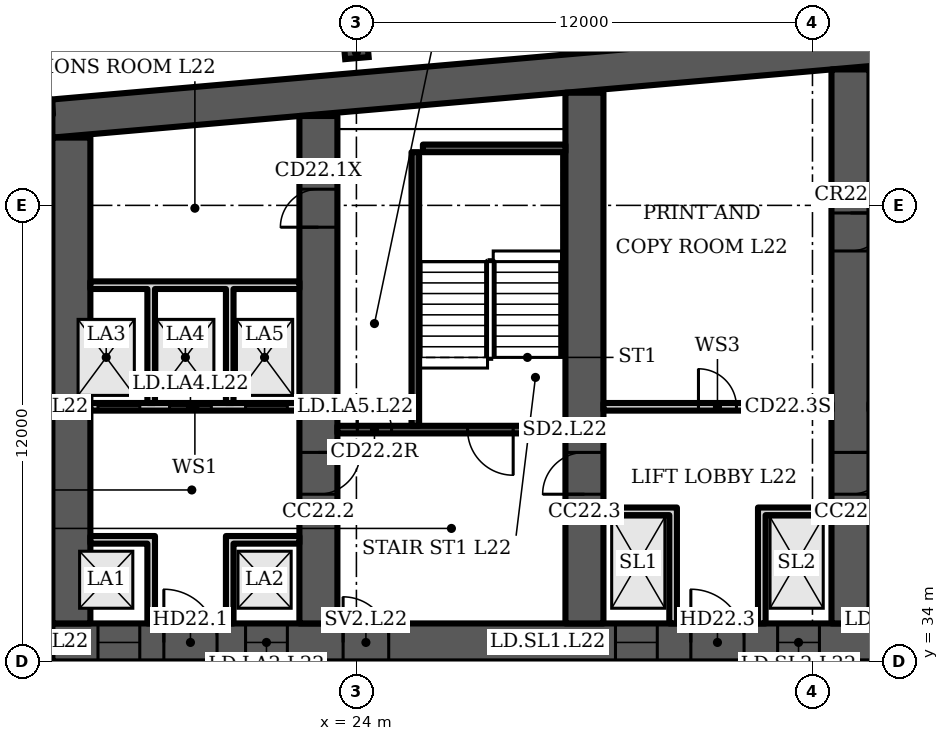
"""IFC4 building model, lengths in metres.
Left out: names, types, materials, properties, quantities, classifications, styles, units other than length and angle.
Written with IfcOpenShell. Run it as: python <this file> out.ifc"""

import sys

from ifc_helpers import new_model, si_unit, direction, frame, frame_2d, origin, origin_2d, place, context, subcontext, project, spatial, polyline, rectangle, i_section, outline, extrude, element, fill, save


model = new_model("IFC4")
c1 = context("Model", 3, precision=1e-05, world=origin(), true_north=direction((0.0, 1.0)))
c2 = subcontext(c1, "Body", "Model", "MODEL_VIEW")
j1 = project(units=[si_unit("LENGTHUNIT", "METRE"), si_unit("PLANEANGLEUNIT", "RADIAN")], contexts=[c1])
p1 = place(None, origin())
s1 = spatial("IfcSite", under=j1, at=p1, CompositionType="ELEMENT")
p2 = place(p1, origin())
s2 = spatial("IfcBuilding", under=s1, at=p2, CompositionType="ELEMENT")
p3 = place(p2, frame((0.0, 0.0, 100.3)))
s3 = spatial("IfcBuildingStorey", under=s2, at=p3, CompositionType="ELEMENT", Elevation=100.3)
p4 = place(p3, frame((0.0, 0.0, -0.0)))
e1 = element("IfcWall", 1, at=p4, inside=s3, PredefinedType="SHEAR", context=c2, shape_type="SweptSolid", body=[
    extrude(outline(polyline([(16.0, 47.784), (40.5, 49.927), (65.0, 47.784), (65.0, 48.787), (40.5, 50.931), (16.0, 48.787), (16.0, 47.784)])), origin(), (0.0, 0.0, 1.0), 3.6),
])
p5 = place(p3, frame((16.0, 34.5, 0.0), z_axis=(0.0, 0.0, 1.0), x_axis=(1.0, 0.0, 0.0)))
e2 = element("IfcWall", 2, at=p5, inside=s3, PredefinedType="SHEAR", context=c2, shape_type="SweptSolid", body=[
    extrude(rectangle(XDim=49.0, YDim=1.0, at=frame_2d((24.5, 0.0))), origin(), (0.0, 0.0, 1.0), 3.6),
])
p6 = place(p5, frame((1.2, 0.0, 0.0)))
e3 = element("IfcOpeningElement", 3, at=p6, cuts=e2, PredefinedType="OPENING", context=c2, shape_type="SweptSolid", body=[
    extrude(rectangle(XDim=1.1, YDim=2.1, at=frame_2d((0.55, 1.05))), frame((0.0, 0.51, 0.0), z_axis=(0.0, -1.0, 0.0), x_axis=(1.0, 0.0, 0.0)), (0.0, 0.0, 1.0), 1.02),
])
p7 = place(p5, frame((5.083, 0.0, 0.0)))
e4 = element("IfcOpeningElement", 4, at=p7, cuts=e2, PredefinedType="OPENING", context=c2, shape_type="SweptSolid", body=[
    extrude(rectangle(XDim=1.1, YDim=2.1, at=frame_2d((0.55, 1.05))), frame((0.0, 0.51, 0.0), z_axis=(0.0, -1.0, 0.0), x_axis=(1.0, 0.0, 0.0)), (0.0, 0.0, 1.0), 1.02),
])
p8 = place(p5, frame((2.933, 0.0, 0.0)))
e5 = element("IfcOpeningElement", 5, at=p8, cuts=e2, PredefinedType="OPENING", context=c2, shape_type="SweptSolid", body=[
    extrude(rectangle(XDim=1.4, YDim=2.1, at=frame_2d((0.7, 1.05))), frame((0.0, 0.51, 0.0), z_axis=(0.0, -1.0, 0.0), x_axis=(1.0, 0.0, 0.0)), (0.0, 0.0, 1.0), 1.02),
])
p9 = place(p5, frame((7.65, 0.0, 0.0)))
e6 = element("IfcOpeningElement", 6, at=p9, cuts=e2, PredefinedType="OPENING", context=c2, shape_type="SweptSolid", body=[
    extrude(rectangle(XDim=1.2, YDim=2.1, at=frame_2d((0.6, 1.05))), frame((0.0, 0.51, 0.0), z_axis=(0.0, -1.0, 0.0), x_axis=(1.0, 0.0, 0.0)), (0.0, 0.0, 1.0), 1.02),
])
p10 = place(p5, frame((14.817, 0.0, 0.0)))
e7 = element("IfcOpeningElement", 7, at=p10, cuts=e2, PredefinedType="OPENING", context=c2, shape_type="SweptSolid", body=[
    extrude(rectangle(XDim=1.1, YDim=2.1, at=frame_2d((0.55, 1.05))), frame((0.0, 0.51, 0.0), z_axis=(0.0, -1.0, 0.0), x_axis=(1.0, 0.0, 0.0)), (0.0, 0.0, 1.0), 1.02),
])
p11 = place(p5, frame((19.083, 0.0, 0.0)))
e8 = element("IfcOpeningElement", 8, at=p11, cuts=e2, PredefinedType="OPENING", context=c2, shape_type="SweptSolid", body=[
    extrude(rectangle(XDim=1.1, YDim=2.1, at=frame_2d((0.55, 1.05))), frame((0.0, 0.51, 0.0), z_axis=(0.0, -1.0, 0.0), x_axis=(1.0, 0.0, 0.0)), (0.0, 0.0, 1.0), 1.02),
])
p12 = place(p5, frame((16.8, 0.0, 0.0)))
e9 = element("IfcOpeningElement", 9, at=p12, cuts=e2, PredefinedType="OPENING", context=c2, shape_type="SweptSolid", body=[
    extrude(rectangle(XDim=1.4, YDim=2.1, at=frame_2d((0.7, 1.05))), frame((0.0, 0.51, 0.0), z_axis=(0.0, -1.0, 0.0), x_axis=(1.0, 0.0, 0.0)), (0.0, 0.0, 1.0), 1.02),
])
p13 = place(p5, frame((21.817, 0.0, 0.0)))
e10 = element("IfcOpeningElement", 10, at=p13, cuts=e2, PredefinedType="OPENING", context=c2, shape_type="SweptSolid", body=[
    extrude(rectangle(XDim=1.1, YDim=2.1, at=frame_2d((0.55, 1.05))), frame((0.0, 0.51, 0.0), z_axis=(0.0, -1.0, 0.0), x_axis=(1.0, 0.0, 0.0)), (0.0, 0.0, 1.0), 1.02),
])
p14 = place(p5, frame((26.083, 0.0, 0.0)))
e11 = element("IfcOpeningElement", 11, at=p14, cuts=e2, PredefinedType="OPENING", context=c2, shape_type="SweptSolid", body=[
    extrude(rectangle(XDim=1.1, YDim=2.1, at=frame_2d((0.55, 1.05))), frame((0.0, 0.51, 0.0), z_axis=(0.0, -1.0, 0.0), x_axis=(1.0, 0.0, 0.0)), (0.0, 0.0, 1.0), 1.02),
])
p15 = place(p5, frame((33.15, 0.0, 0.0)))
e12 = element("IfcOpeningElement", 12, at=p15, cuts=e2, PredefinedType="OPENING", context=c2, shape_type="SweptSolid", body=[
    extrude(rectangle(XDim=1.2, YDim=2.1, at=frame_2d((0.6, 1.05))), frame((0.0, 0.51, 0.0), z_axis=(0.0, -1.0, 0.0), x_axis=(1.0, 0.0, 0.0)), (0.0, 0.0, 1.0), 1.02),
])
p16 = place(p5, frame((37.8, 0.0, 0.0)))
e13 = element("IfcOpeningElement", 13, at=p16, cuts=e2, PredefinedType="OPENING", context=c2, shape_type="SweptSolid", body=[
    extrude(rectangle(XDim=1.4, YDim=2.1, at=frame_2d((0.7, 1.05))), frame((0.0, 0.51, 0.0), z_axis=(0.0, -1.0, 0.0), x_axis=(1.0, 0.0, 0.0)), (0.0, 0.0, 1.0), 1.02),
])
p17 = place(p5, frame((42.817, 0.0, 0.0)))
e14 = element("IfcOpeningElement", 14, at=p17, cuts=e2, PredefinedType="OPENING", context=c2, shape_type="SweptSolid", body=[
    extrude(rectangle(XDim=1.1, YDim=2.1, at=frame_2d((0.55, 1.05))), frame((0.0, 0.51, 0.0), z_axis=(0.0, -1.0, 0.0), x_axis=(1.0, 0.0, 0.0)), (0.0, 0.0, 1.0), 1.02),
])
p18 = place(p5, frame((46.7, 0.0, 0.0)))
e15 = element("IfcOpeningElement", 15, at=p18, cuts=e2, PredefinedType="OPENING", context=c2, shape_type="SweptSolid", body=[
    extrude(rectangle(XDim=1.1, YDim=2.1, at=frame_2d((0.55, 1.05))), frame((0.0, 0.51, 0.0), z_axis=(0.0, -1.0, 0.0), x_axis=(1.0, 0.0, 0.0)), (0.0, 0.0, 1.0), 1.02),
])
p19 = place(p5, frame((44.667, 0.0, 0.0)))
e16 = element("IfcOpeningElement", 16, at=p19, cuts=e2, PredefinedType="OPENING", context=c2, shape_type="SweptSolid", body=[
    extrude(rectangle(XDim=1.4, YDim=2.1, at=frame_2d((0.7, 1.05))), frame((0.0, 0.51, 0.0), z_axis=(0.0, -1.0, 0.0), x_axis=(1.0, 0.0, 0.0)), (0.0, 0.0, 1.0), 1.02),
])
p20 = place(p3, frame((16.5, 35.0, 0.0), z_axis=(0.0, 0.0, 1.0), x_axis=(0.0, 1.0, 0.0)))
e17 = element("IfcWall", 17, at=p20, inside=s3, PredefinedType="SHEAR", context=c2, shape_type="SweptSolid", body=[
    extrude(rectangle(XDim=12.784, YDim=1.0, at=frame_2d((6.392, 0.0))), origin(), (0.0, 0.0, 1.0), 3.6),
])
p21 = place(p3, frame((23.0, 35.0, 0.0), z_axis=(0.0, 0.0, 1.0), x_axis=(0.0, 1.0, 0.0)))
e18 = element("IfcWall", 18, at=p21, inside=s3, PredefinedType="SHEAR", context=c2, shape_type="SweptSolid", body=[
    extrude(rectangle(XDim=13.352, YDim=1.0, at=frame_2d((6.676, 0.0))), origin(), (0.0, 0.0, 1.0), 3.6),
])
p22 = place(p21, frame((10.426, 0.0, 0.0)))
e19 = element("IfcOpeningElement", 19, at=p22, cuts=e18, PredefinedType="OPENING", context=c2, shape_type="SweptSolid", body=[
    extrude(rectangle(XDim=1.0, YDim=2.1, at=frame_2d((0.5, 1.05))), frame((0.0, 0.51, 0.0), z_axis=(0.0, -1.0, 0.0), x_axis=(1.0, 0.0, 0.0)), (0.0, 0.0, 1.0), 1.02),
])
p23 = place(p21, frame((3.4, 0.0, 0.0)))
e20 = element("IfcOpeningElement", 20, at=p23, cuts=e18, PredefinedType="OPENING", context=c2, shape_type="SweptSolid", body=[
    extrude(rectangle(XDim=1.1, YDim=2.1, at=frame_2d((0.55, 1.05))), frame((0.0, 0.51, 0.0), z_axis=(0.0, -1.0, 0.0), x_axis=(1.0, 0.0, 0.0)), (0.0, 0.0, 1.0), 1.02),
])
p24 = place(p3, frame((30.0, 35.0, 0.0), z_axis=(0.0, 0.0, 1.0), x_axis=(0.0, 1.0, 0.0)))
e21 = element("IfcWall", 21, at=p24, inside=s3, PredefinedType="SHEAR", context=c2, shape_type="SweptSolid", body=[
    extrude(rectangle(XDim=13.965, YDim=1.0, at=frame_2d((6.982, 0.0))), origin(), (0.0, 0.0, 1.0), 3.6),
])
p25 = place(p24, frame((3.4, 0.0, 0.0)))
e22 = element("IfcOpeningElement", 22, at=p25, cuts=e21, PredefinedType="OPENING", context=c2, shape_type="SweptSolid", body=[
    extrude(rectangle(XDim=1.1, YDim=2.1, at=frame_2d((0.55, 1.05))), frame((0.0, 0.51, 0.0), z_axis=(0.0, -1.0, 0.0), x_axis=(1.0, 0.0, 0.0)), (0.0, 0.0, 1.0), 1.02),
])
p26 = place(p3, frame((37.0, 35.0, 0.0), z_axis=(0.0, 0.0, 1.0), x_axis=(0.0, 1.0, 0.0)))
e23 = element("IfcWall", 23, at=p26, inside=s3, PredefinedType="SHEAR", context=c2, shape_type="SweptSolid", body=[
    extrude(rectangle(XDim=14.577, YDim=1.0, at=frame_2d((7.289, 0.0))), origin(), (0.0, 0.0, 1.0), 3.6),
])
p27 = place(p26, frame((3.4, 0.0, 0.0)))
e24 = element("IfcOpeningElement", 24, at=p27, cuts=e23, PredefinedType="OPENING", context=c2, shape_type="SweptSolid", body=[
    extrude(rectangle(XDim=1.1, YDim=2.1, at=frame_2d((0.55, 1.05))), frame((0.0, 0.51, 0.0), z_axis=(0.0, -1.0, 0.0), x_axis=(1.0, 0.0, 0.0)), (0.0, 0.0, 1.0), 1.02),
])
p28 = place(p26, frame((9.8, 0.0, 0.0)))
e25 = element("IfcOpeningElement", 25, at=p28, cuts=e23, PredefinedType="OPENING", context=c2, shape_type="SweptSolid", body=[
    extrude(rectangle(XDim=1.0, YDim=2.1, at=frame_2d((0.5, 1.05))), frame((0.0, 0.51, 0.0), z_axis=(0.0, -1.0, 0.0), x_axis=(1.0, 0.0, 0.0)), (0.0, 0.0, 1.0), 1.02),
])
p29 = place(p3, frame((24.0, 50.027, 0.0), z_axis=(0.0, 0.0, 1.0), x_axis=(-0.087156, 0.996198, 0.0)))
e26 = element("IfcColumn", 26, at=p29, inside=s3, PredefinedType="COLUMN", context=c2, shape_type="SweptSolid", body=[
    extrude(i_section(OverallWidth=0.305, OverallDepth=0.62, WebThickness=0.021, FlangeThickness=0.04, FilletRadius=0.027, at=origin_2d()), origin(), (0.0, 0.0, 1.0), 3.6),
])
p30 = place(p3, frame((16.0, 48.587, 0.0), z_axis=(0.0, 0.0, 1.0), x_axis=(-0.996194, -0.087168, 0.0)))
e27 = element("IfcWall", 27, at=p30, inside=s3, PredefinedType="SOLIDWALL", context=c2, shape_type="SweptSolid", body=[
    extrude(rectangle(XDim=2.994, YDim=0.4, at=frame_2d((1.497, 0.0))), origin(), (0.0, 0.0, 1.0), 3.2),
])
p31 = place(p3, frame((17.0, 40.7, 0.0), z_axis=(0.0, 0.0, 1.0), x_axis=(1.0, 0.0, 0.0)))
e28 = element("IfcWall", 28, at=p31, inside=s3, PredefinedType="PARTITIONING", context=c2, shape_type="SweptSolid", body=[
    extrude(rectangle(XDim=5.5, YDim=0.2, at=frame_2d((2.75, 0.0))), origin(), (0.0, 0.0, 1.0), 3.2),
])
p32 = place(p31, frame((0.2, 0.0, 0.0)))
e29 = element("IfcOpeningElement", 29, at=p32, cuts=e28, PredefinedType="OPENING", context=c2, shape_type="SweptSolid", body=[
    extrude(rectangle(XDim=1.1, YDim=2.1, at=frame_2d((0.55, 1.05))), frame((0.0, 0.11, 0.0), z_axis=(0.0, -1.0, 0.0), x_axis=(1.0, 0.0, 0.0)), (0.0, 0.0, 1.0), 0.22),
])
p33 = place(p31, frame((2.083, 0.0, 0.0)))
e30 = element("IfcOpeningElement", 30, at=p33, cuts=e28, PredefinedType="OPENING", context=c2, shape_type="SweptSolid", body=[
    extrude(rectangle(XDim=1.1, YDim=2.1, at=frame_2d((0.55, 1.05))), frame((0.0, 0.11, 0.0), z_axis=(0.0, -1.0, 0.0), x_axis=(1.0, 0.0, 0.0)), (0.0, 0.0, 1.0), 0.22),
])
p34 = place(p31, frame((4.083, 0.0, 0.0)))
e31 = element("IfcOpeningElement", 31, at=p34, cuts=e28, PredefinedType="OPENING", context=c2, shape_type="SweptSolid", body=[
    extrude(rectangle(XDim=1.1, YDim=2.1, at=frame_2d((0.55, 1.05))), frame((0.0, 0.11, 0.0), z_axis=(0.0, -1.0, 0.0), x_axis=(1.0, 0.0, 0.0)), (0.0, 0.0, 1.0), 0.22),
])
p35 = place(p3, frame((0.0, 0.0, -0.0)))
e32 = element("IfcWall", 32, at=p35, inside=s3, PredefinedType="PARTITIONING", context=c2, shape_type="SweptSolid", body=[
    extrude(outline(polyline([(18.5, 37.1), (17.0, 37.1), (17.0, 37.3), (18.5, 37.3), (18.7, 37.3), (18.7, 35.0), (18.5, 35.0), (18.5, 37.1)])), origin(), (0.0, 0.0, 1.0), 3.2),
])
p36 = place(p3, frame((0.0, 0.0, -0.0)))
e33 = element("IfcWall", 33, at=p36, inside=s3, PredefinedType="PARTITIONING", context=c2, shape_type="SweptSolid", body=[
    extrude(outline(polyline([(20.567, 37.3), (20.767, 37.3), (22.5, 37.3), (22.5, 37.1), (20.767, 37.1), (20.767, 35.0), (20.567, 35.0), (20.567, 37.3)])), origin(), (0.0, 0.0, 1.0), 3.2),
])
p37 = place(p3, frame((0.0, 0.0, -0.0)))
e34 = element("IfcWall", 34, at=p37, inside=s3, PredefinedType="PARTITIONING", context=c2, shape_type="SweptSolid", body=[
    extrude(outline(polyline([(18.7, 40.8), (18.5, 40.8), (18.5, 43.8), (17.0, 43.8), (17.0, 44.0), (22.5, 44.0), (22.5, 43.8), (20.767, 43.8), (20.767, 40.8), (20.567, 40.8), (20.567, 43.8), (18.7, 43.8), (18.7, 40.8)])), origin(), (0.0, 0.0, 1.0), 3.2),
])
p38 = place(p3, frame((23.5, 40.1, 0.0), z_axis=(0.0, 0.0, 1.0), x_axis=(1.0, 0.0, 0.0)))
e35 = element("IfcWall", 35, at=p38, inside=s3, PredefinedType="SHEAR", context=c2, shape_type="SweptSolid", body=[
    extrude(rectangle(XDim=6.0, YDim=0.2, at=frame_2d((3.0, 0.0))), origin(), (0.0, 0.0, 1.0), 3.2),
])
p39 = place(p38, frame((3.425, 0.0, 0.0)))
e36 = element("IfcOpeningElement", 36, at=p39, cuts=e35, PredefinedType="OPENING", context=c2, shape_type="SweptSolid", body=[
    extrude(rectangle(XDim=1.2, YDim=2.1, at=frame_2d((0.6, 1.05))), frame((0.0, 0.11, 0.0), z_axis=(0.0, -1.0, 0.0), x_axis=(1.0, 0.0, 0.0)), (0.0, 0.0, 1.0), 0.22),
])
p40 = place(p38, frame((0.525, 0.0, 0.0)))
e37 = element("IfcOpeningElement", 37, at=p40, cuts=e35, PredefinedType="OPENING", context=c2, shape_type="SweptSolid", body=[
    extrude(rectangle(XDim=0.9, YDim=2.1, at=frame_2d((0.45, 1.05))), frame((0.0, 0.11, 0.0), z_axis=(0.0, -1.0, 0.0), x_axis=(1.0, 0.0, 0.0)), (0.0, 0.0, 1.0), 0.22),
])
p41 = place(p3, frame((25.55, 40.2, 0.0), z_axis=(0.0, 0.0, 1.0), x_axis=(0.0, 1.0, 0.0)))
e38 = element("IfcWall", 38, at=p41, inside=s3, PredefinedType="SHEAR", context=c2, shape_type="SweptSolid", body=[
    extrude(rectangle(XDim=7.2, YDim=0.2, at=frame_2d((3.6, 0.0))), origin(), (0.0, 0.0, 1.0), 3.2),
])
p42 = place(p3, frame((25.75, 47.5, 0.0), z_axis=(0.0, 0.0, 1.0), x_axis=(1.0, 0.0, 0.0)))
e39 = element("IfcWall", 39, at=p42, inside=s3, PredefinedType="SHEAR", context=c2, shape_type="SweptSolid", body=[
    extrude(rectangle(XDim=3.75, YDim=0.2, at=frame_2d((1.875, 0.0))), origin(), (0.0, 0.0, 1.0), 3.2),
])
p43 = place(p3, frame((30.5, 40.7, 0.0), z_axis=(0.0, 0.0, 1.0), x_axis=(1.0, 0.0, 0.0)))
e40 = element("IfcWall", 40, at=p43, inside=s3, PredefinedType="PARTITIONING", context=c2, shape_type="SweptSolid", body=[
    extrude(rectangle(XDim=6.0, YDim=0.2, at=frame_2d((3.0, 0.0))), origin(), (0.0, 0.0, 1.0), 3.2),
])
p44 = place(p43, frame((2.5, 0.0, 0.0)))
e41 = element("IfcOpeningElement", 41, at=p44, cuts=e40, PredefinedType="OPENING", context=c2, shape_type="SweptSolid", body=[
    extrude(rectangle(XDim=1.0, YDim=2.1, at=frame_2d((0.5, 1.05))), frame((0.0, 0.11, 0.0), z_axis=(0.0, -1.0, 0.0), x_axis=(1.0, 0.0, 0.0)), (0.0, 0.0, 1.0), 0.22),
])
p45 = place(p3, frame((0.0, 0.0, -0.0)))
e42 = element("IfcWall", 42, at=p45, inside=s3, PredefinedType="PARTITIONING", context=c2, shape_type="SweptSolid", body=[
    extrude(outline(polyline([(32.233, 37.85), (30.5, 37.85), (30.5, 38.05), (32.233, 38.05), (32.433, 38.05), (32.433, 35.0), (32.233, 35.0), (32.233, 37.85)])), origin(), (0.0, 0.0, 1.0), 3.2),
])
p46 = place(p3, frame((0.0, 0.0, -0.0)))
e43 = element("IfcWall", 43, at=p46, inside=s3, PredefinedType="PARTITIONING", context=c2, shape_type="SweptSolid", body=[
    extrude(outline(polyline([(34.567, 38.05), (34.767, 38.05), (36.5, 38.05), (36.5, 37.85), (34.767, 37.85), (34.767, 35.0), (34.567, 35.0), (34.567, 38.05)])), origin(), (0.0, 0.0, 1.0), 3.2),
])
p47 = place(p6, origin())
e44 = element("IfcDoor", 44, at=p47, inside=s3, OperationType="DOUBLE_DOOR_SLIDING", PredefinedType="DOOR", context=c2, shape_type="SweptSolid", body=[
    extrude(rectangle(XDim=1.1, YDim=2.1, at=frame_2d((0.55, 1.05))), frame((0.0, 0.025, 0.0), z_axis=(0.0, -1.0, 0.0), x_axis=(1.0, 0.0, 0.0)), (0.0, 0.0, 1.0), 0.05),
])
fill(e3, e44)
p48 = place(p7, origin())
e45 = element("IfcDoor", 45, at=p48, inside=s3, OperationType="DOUBLE_DOOR_SLIDING", PredefinedType="DOOR", context=c2, shape_type="SweptSolid", body=[
    extrude(rectangle(XDim=1.1, YDim=2.1, at=frame_2d((0.55, 1.05))), frame((0.0, 0.025, 0.0), z_axis=(0.0, -1.0, 0.0), x_axis=(1.0, 0.0, 0.0)), (0.0, 0.0, 1.0), 0.05),
])
fill(e4, e45)
p49 = place(p8, origin())
e46 = element("IfcDoor", 46, at=p49, inside=s3, OperationType="DOUBLE_DOOR_SINGLE_SWING", PredefinedType="DOOR", context=c2, shape_type="SweptSolid", body=[
    extrude(rectangle(XDim=1.4, YDim=2.1, at=frame_2d((0.7, 1.05))), frame((0.0, 0.025, 0.0), z_axis=(0.0, -1.0, 0.0), x_axis=(1.0, 0.0, 0.0)), (0.0, 0.0, 1.0), 0.05),
])
fill(e5, e46)
p50 = place(p32, origin())
e47 = element("IfcDoor", 47, at=p50, inside=s3, OperationType="DOUBLE_DOOR_SLIDING", PredefinedType="DOOR", context=c2, shape_type="SweptSolid", body=[
    extrude(rectangle(XDim=1.1, YDim=2.1, at=frame_2d((0.55, 1.05))), frame((0.0, 0.025, 0.0), z_axis=(0.0, -1.0, 0.0), x_axis=(1.0, 0.0, 0.0)), (0.0, 0.0, 1.0), 0.05),
])
fill(e29, e47)
p51 = place(p33, origin())
e48 = element("IfcDoor", 48, at=p51, inside=s3, OperationType="DOUBLE_DOOR_SLIDING", PredefinedType="DOOR", context=c2, shape_type="SweptSolid", body=[
    extrude(rectangle(XDim=1.1, YDim=2.1, at=frame_2d((0.55, 1.05))), frame((0.0, 0.025, 0.0), z_axis=(0.0, -1.0, 0.0), x_axis=(1.0, 0.0, 0.0)), (0.0, 0.0, 1.0), 0.05),
])
fill(e30, e48)
p52 = place(p34, origin())
e49 = element("IfcDoor", 49, at=p52, inside=s3, OperationType="DOUBLE_DOOR_SLIDING", PredefinedType="DOOR", context=c2, shape_type="SweptSolid", body=[
    extrude(rectangle(XDim=1.1, YDim=2.1, at=frame_2d((0.55, 1.05))), frame((0.0, 0.025, 0.0), z_axis=(0.0, -1.0, 0.0), x_axis=(1.0, 0.0, 0.0)), (0.0, 0.0, 1.0), 0.05),
])
fill(e31, e49)
p53 = place(p22, origin())
e50 = element("IfcDoor", 50, at=p53, inside=s3, OperationType="SINGLE_SWING_LEFT", PredefinedType="DOOR", context=c2, shape_type="SweptSolid", body=[
    extrude(rectangle(XDim=1.0, YDim=2.1, at=frame_2d((0.5, 1.05))), frame((0.0, 0.5, 0.0), z_axis=(0.0, -1.0, 0.0), x_axis=(1.0, 0.0, 0.0)), (0.0, 0.0, 1.0), 1.0),
])
fill(e19, e50)
p54 = place(p39, origin())
e51 = element("IfcDoor", 51, at=p54, inside=s3, OperationType="SINGLE_SWING_RIGHT", PredefinedType="DOOR", context=c2, shape_type="SweptSolid", body=[
    extrude(rectangle(XDim=1.2, YDim=2.1, at=frame_2d((0.6, 1.05))), frame((0.0, 0.025, 0.0), z_axis=(0.0, -1.0, 0.0), x_axis=(1.0, 0.0, 0.0)), (0.0, 0.0, 1.0), 0.05),
])
fill(e36, e51)
p55 = place(p40, origin())
e52 = element("IfcDoor", 52, at=p55, inside=s3, OperationType="SINGLE_SWING_LEFT", PredefinedType="DOOR", context=c2, shape_type="SweptSolid", body=[
    extrude(rectangle(XDim=0.9, YDim=2.1, at=frame_2d((0.45, 1.05))), frame((0.0, 0.025, 0.0), z_axis=(0.0, -1.0, 0.0), x_axis=(1.0, 0.0, 0.0)), (0.0, 0.0, 1.0), 0.05),
])
fill(e37, e52)
p56 = place(p9, origin())
e53 = element("IfcDoor", 53, at=p56, inside=s3, OperationType="SINGLE_SWING_LEFT", PredefinedType="DOOR", context=c2, shape_type="SweptSolid", body=[
    extrude(rectangle(XDim=1.2, YDim=2.1, at=frame_2d((0.6, 1.05))), frame((0.0, 0.025, 0.0), z_axis=(0.0, -1.0, 0.0), x_axis=(1.0, 0.0, 0.0)), (0.0, 0.0, 1.0), 0.05),
])
fill(e6, e53)
p57 = place(p10, origin())
e54 = element("IfcDoor", 54, at=p57, inside=s3, OperationType="DOUBLE_DOOR_SLIDING", PredefinedType="DOOR", context=c2, shape_type="SweptSolid", body=[
    extrude(rectangle(XDim=1.1, YDim=2.1, at=frame_2d((0.55, 1.05))), frame((0.0, 0.025, 0.0), z_axis=(0.0, -1.0, 0.0), x_axis=(1.0, 0.0, 0.0)), (0.0, 0.0, 1.0), 0.05),
])
fill(e7, e54)
p58 = place(p11, origin())
e55 = element("IfcDoor", 55, at=p58, inside=s3, OperationType="DOUBLE_DOOR_SLIDING", PredefinedType="DOOR", context=c2, shape_type="SweptSolid", body=[
    extrude(rectangle(XDim=1.1, YDim=2.1, at=frame_2d((0.55, 1.05))), frame((0.0, 0.025, 0.0), z_axis=(0.0, -1.0, 0.0), x_axis=(1.0, 0.0, 0.0)), (0.0, 0.0, 1.0), 0.05),
])
fill(e8, e55)
p59 = place(p12, origin())
e56 = element("IfcDoor", 56, at=p59, inside=s3, OperationType="DOUBLE_DOOR_SINGLE_SWING", PredefinedType="DOOR", context=c2, shape_type="SweptSolid", body=[
    extrude(rectangle(XDim=1.4, YDim=2.1, at=frame_2d((0.7, 1.05))), frame((0.0, 0.025, 0.0), z_axis=(0.0, -1.0, 0.0), x_axis=(1.0, 0.0, 0.0)), (0.0, 0.0, 1.0), 0.05),
])
fill(e9, e56)
p60 = place(p44, origin())
e57 = element("IfcDoor", 57, at=p60, inside=s3, OperationType="SINGLE_SWING_LEFT", PredefinedType="DOOR", context=c2, shape_type="SweptSolid", body=[
    extrude(rectangle(XDim=1.0, YDim=2.1, at=frame_2d((0.5, 1.05))), frame((0.0, 0.025, 0.0), z_axis=(0.0, -1.0, 0.0), x_axis=(1.0, 0.0, 0.0)), (0.0, 0.0, 1.0), 0.05),
])
fill(e41, e57)
p61 = place(p23, origin())
e58 = element("IfcDoor", 58, at=p61, inside=s3, OperationType="SINGLE_SWING_RIGHT", PredefinedType="DOOR", context=c2, shape_type="SweptSolid", body=[
    extrude(rectangle(XDim=1.1, YDim=2.1, at=frame_2d((0.55, 1.05))), frame((0.0, 0.025, 0.0), z_axis=(0.0, -1.0, 0.0), x_axis=(1.0, 0.0, 0.0)), (0.0, 0.0, 1.0), 0.05),
])
fill(e20, e58)
p62 = place(p25, origin())
e59 = element("IfcDoor", 59, at=p62, inside=s3, OperationType="SINGLE_SWING_LEFT", PredefinedType="DOOR", context=c2, shape_type="SweptSolid", body=[
    extrude(rectangle(XDim=1.1, YDim=2.1, at=frame_2d((0.55, 1.05))), frame((0.0, 0.025, 0.0), z_axis=(0.0, -1.0, 0.0), x_axis=(1.0, 0.0, 0.0)), (0.0, 0.0, 1.0), 0.05),
])
fill(e22, e59)
p63 = place(p27, origin())
e60 = element("IfcDoor", 60, at=p63, inside=s3, OperationType="SINGLE_SWING_RIGHT", PredefinedType="DOOR", context=c2, shape_type="SweptSolid", body=[
    extrude(rectangle(XDim=1.1, YDim=2.1, at=frame_2d((0.55, 1.05))), frame((0.0, 0.025, 0.0), z_axis=(0.0, -1.0, 0.0), x_axis=(1.0, 0.0, 0.0)), (0.0, 0.0, 1.0), 0.05),
])
fill(e24, e60)
p64 = place(p28, origin())
e61 = element("IfcDoor", 61, at=p64, inside=s3, OperationType="SINGLE_SWING_RIGHT", PredefinedType="DOOR", context=c2, shape_type="SweptSolid", body=[
    extrude(rectangle(XDim=1.0, YDim=2.1, at=frame_2d((0.5, 1.05))), frame((0.0, 0.5, 0.0), z_axis=(0.0, -1.0, 0.0), x_axis=(1.0, 0.0, 0.0)), (0.0, 0.0, 1.0), 1.0),
])
fill(e25, e61)
save(model, sys.argv[1])
